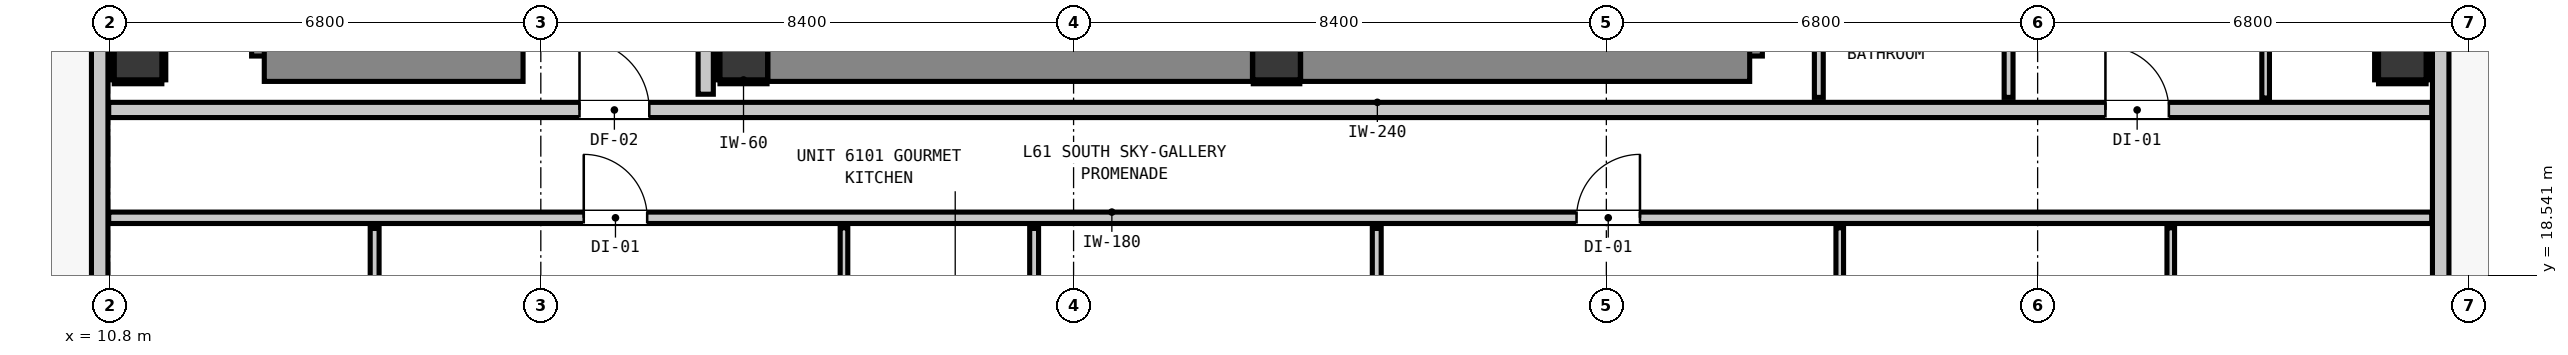
"""IFC4 building model, lengths in metres.
Left out: names, types, materials, properties, quantities, classifications, styles, units other than length and angle.
Written with IfcOpenShell. Run it as: python <this file> out.ifc"""

import sys

from ifc_helpers import new_model, si_unit, direction, frame, frame_2d, origin, origin_2d, place, context, subcontext, project, spatial, rectangle, extrude, element, fill, save


model = new_model("IFC4")
c1 = context("Model", 3, precision=1e-05, world=origin(), true_north=direction((0.0, 1.0)))
c2 = subcontext(c1, "Body", "Model", "MODEL_VIEW")
j1 = project(units=[si_unit("LENGTHUNIT", "METRE"), si_unit("PLANEANGLEUNIT", "RADIAN")], contexts=[c1])
p1 = place(None, origin())
s1 = spatial("IfcSite", under=j1, at=p1, CompositionType="ELEMENT")
p2 = place(p1, origin())
s2 = spatial("IfcBuilding", under=s1, at=p2, CompositionType="ELEMENT")
p3 = place(p2, frame((0.0, 0.0, 210.08)))
s3 = spatial("IfcBuildingStorey", under=s2, at=p3, CompositionType="ELEMENT", Elevation=210.08)
for number, where, z_axis, x_axis in (
    (1, (20.8, 22.0, 0.0), (0.0, 0.0, 1.0), (1.0, 0.0, 0.0)),
    (2, (29.2, 22.0, 0.0), (0.0, 0.0, 1.0), (1.0, 0.0, 0.0)),
):
    element("IfcColumn", number, at=place(p3, frame(where, z_axis=z_axis, x_axis=x_axis)), inside=s3, PredefinedType="COLUMN", context=c2, shape_type="SweptSolid", body=[
        extrude(rectangle(XDim=0.75, YDim=0.75, at=origin_2d()), origin(), (0.0, 0.0, 1.0), 3.32),
    ])
p4 = place(p3, frame((13.44, 22.0, 0.0), z_axis=(0.0, 0.0, 1.0), x_axis=(0.0, 1.0, 0.0)))
e3 = element("IfcWall", 3, at=p4, inside=s3, PredefinedType="SHEAR", context=c2, shape_type="SweptSolid", body=[
    extrude(rectangle(XDim=8.32, YDim=0.8, at=frame_2d((4.16, 0.0))), origin(), (0.0, 0.0, 1.0), 3.32),
])
p5 = place(p3, frame((13.24, 22.0, 0.0), z_axis=(0.0, 0.0, 1.0), x_axis=(1.0, 0.0, 0.0)))
e4 = element("IfcWall", 4, at=p5, inside=s3, PredefinedType="SHEAR", context=c2, shape_type="SweptSolid", body=[
    extrude(rectangle(XDim=4.08, YDim=0.8, at=frame_2d((2.04, 0.0))), origin(), (0.0, 0.0, 1.0), 3.32),
])
p6 = place(p3, frame((36.46, 22.0, 0.0), z_axis=(0.0, 0.0, 1.0), x_axis=(0.0, 1.0, 0.0)))
e5 = element("IfcWall", 5, at=p6, inside=s3, PredefinedType="SHEAR", context=c2, shape_type="SweptSolid", body=[
    extrude(rectangle(XDim=8.32, YDim=0.8, at=frame_2d((4.16, 0.0))), origin(), (0.0, 0.0, 1.0), 3.32),
])
p7 = place(p3, frame((29.58, 22.0, 0.0), z_axis=(0.0, 0.0, 1.0), x_axis=(1.0, 0.0, 0.0)))
e6 = element("IfcWall", 6, at=p7, inside=s3, PredefinedType="SHEAR", context=c2, shape_type="SweptSolid", body=[
    extrude(rectangle(XDim=7.08, YDim=0.8, at=frame_2d((3.54, 0.0))), origin(), (0.0, 0.0, 1.0), 3.32),
])
p8 = place(p3, frame((21.18, 22.0, 0.0), z_axis=(0.0, 0.0, 1.0), x_axis=(1.0, 0.0, 0.0)))
e7 = element("IfcWall", 7, at=p8, inside=s3, PredefinedType="SHEAR", context=c2, shape_type="SweptSolid", body=[
    extrude(rectangle(XDim=7.64, YDim=0.8, at=frame_2d((3.82, 0.0))), origin(), (0.0, 0.0, 1.0), 3.32),
])
for number, where, z_axis, x_axis in (
    (8, (11.25, 22.0, -0.2), (0.0, 0.0, 1.0), (1.0, 0.0, 0.0)),
    (9, (46.95, 22.0, -0.2), (0.0, 0.0, 1.0), (1.0, 0.0, 0.0)),
):
    element("IfcColumn", number, at=place(p3, frame(where, z_axis=z_axis, x_axis=x_axis)), inside=s3, PredefinedType="COLUMN", context=c2, shape_type="SweptSolid", body=[
        extrude(rectangle(XDim=0.75, YDim=0.75, at=origin_2d()), origin(), (0.0, 0.0, 1.0), 3.52),
    ])
p9 = place(p3, frame((10.645, 12.345, 0.0), z_axis=(0.0, 0.0, 1.0), x_axis=(0.0, 1.0, 0.0)))
e10 = element("IfcWall", 10, at=p9, inside=s3, PredefinedType="STANDARD", context=c2, shape_type="SweptSolid", body=[
    extrude(rectangle(XDim=30.31, YDim=0.26, at=frame_2d((15.155, 0.0))), origin(), (0.0, 0.0, 1.0), 3.1),
])
p10 = place(p9, frame((0.507, 0.0, 0.0)))
e11 = element("IfcOpeningElement", 11, at=p10, cuts=e10, PredefinedType="OPENING", context=c2, shape_type="SweptSolid", body=[
    extrude(rectangle(XDim=1.1, YDim=2.15, at=frame_2d((0.55, 1.075))), frame((0.0, 0.14, 0.0), z_axis=(0.0, -1.0, 0.0), x_axis=(1.0, 0.0, 0.0)), (0.0, 0.0, 1.0), 0.28),
])
p11 = place(p9, frame((2.011, 0.0, 0.85)))
e12 = element("IfcOpeningElement", 12, at=p11, cuts=e10, PredefinedType="OPENING", context=c2, shape_type="SweptSolid", body=[
    extrude(rectangle(XDim=0.9, YDim=1.5, at=frame_2d((0.45, 0.75))), frame((0.0, 0.14, 0.0), z_axis=(0.0, -1.0, 0.0), x_axis=(1.0, 0.0, 0.0)), (0.0, 0.0, 1.0), 0.28),
])
p12 = place(p3, frame((47.555, 42.655, 0.0), z_axis=(0.0, 0.0, 1.0), x_axis=(0.0, -1.0, 0.0)))
e13 = element("IfcWall", 13, at=p12, inside=s3, PredefinedType="STANDARD", context=c2, shape_type="SweptSolid", body=[
    extrude(rectangle(XDim=30.31, YDim=0.26, at=frame_2d((15.155, 0.0))), origin(), (0.0, 0.0, 1.0), 3.1),
])
p13 = place(p12, frame((4.082, 0.0, 0.0)))
e14 = element("IfcOpeningElement", 14, at=p13, cuts=e13, PredefinedType="OPENING", context=c2, shape_type="SweptSolid", body=[
    extrude(rectangle(XDim=1.0, YDim=2.15, at=frame_2d((0.5, 1.075))), frame((0.0, 0.14, 0.0), z_axis=(0.0, -1.0, 0.0), x_axis=(1.0, 0.0, 0.0)), (0.0, 0.0, 1.0), 0.28),
])
p14 = place(p12, frame((24.251, 0.0, 0.85)))
e15 = element("IfcOpeningElement", 15, at=p14, cuts=e13, PredefinedType="OPENING", context=c2, shape_type="SweptSolid", body=[
    extrude(rectangle(XDim=1.8, YDim=1.9, at=frame_2d((0.9, 0.95))), frame((0.0, 0.14, 0.0), z_axis=(0.0, -1.0, 0.0), x_axis=(1.0, 0.0, 0.0)), (0.0, 0.0, 1.0), 0.28),
])
p15 = place(p12, frame((27.808, 0.0, 0.85)))
e16 = element("IfcOpeningElement", 16, at=p15, cuts=e13, PredefinedType="OPENING", context=c2, shape_type="SweptSolid", body=[
    extrude(rectangle(XDim=1.8, YDim=1.9, at=frame_2d((0.9, 0.95))), frame((0.0, 0.14, 0.0), z_axis=(0.0, -1.0, 0.0), x_axis=(1.0, 0.0, 0.0)), (0.0, 0.0, 1.0), 0.28),
])
p16 = place(p3, frame((10.787, 21.15, 0.0), z_axis=(0.0, 0.0, 1.0), x_axis=(1.0, 0.0, 0.0)))
e17 = element("IfcWall", 17, at=p16, inside=s3, PredefinedType="PARTITIONING", context=c2, shape_type="SweptSolid", body=[
    extrude(rectangle(XDim=36.626, YDim=0.24, at=frame_2d((18.313, 0.0))), origin(), (0.0, 0.0, 1.0), 3.1),
])
p17 = place(p16, frame((7.423, 0.0, 0.0)))
e18 = element("IfcOpeningElement", 18, at=p17, cuts=e17, PredefinedType="OPENING", context=c2, shape_type="SweptSolid", body=[
    extrude(rectangle(XDim=1.1, YDim=2.15, at=frame_2d((0.55, 1.075))), frame((0.0, 0.13, 0.0), z_axis=(0.0, -1.0, 0.0), x_axis=(1.0, 0.0, 0.0)), (0.0, 0.0, 1.0), 0.26),
])
p18 = place(p16, frame((31.482, 0.0, 0.0)))
e19 = element("IfcOpeningElement", 19, at=p18, cuts=e17, PredefinedType="OPENING", context=c2, shape_type="SweptSolid", body=[
    extrude(rectangle(XDim=1.0, YDim=2.15, at=frame_2d((0.5, 1.075))), frame((0.0, 0.13, 0.0), z_axis=(0.0, -1.0, 0.0), x_axis=(1.0, 0.0, 0.0)), (0.0, 0.0, 1.0), 0.26),
])
p19 = place(p3, frame((10.787, 19.45, 0.0), z_axis=(0.0, 0.0, 1.0), x_axis=(1.0, 0.0, 0.0)))
e20 = element("IfcWall", 20, at=p19, inside=s3, PredefinedType="PARTITIONING", context=c2, shape_type="SweptSolid", body=[
    extrude(rectangle(XDim=36.626, YDim=0.18, at=frame_2d((18.313, 0.0))), origin(), (0.0, 0.0, 1.0), 3.1),
])
p20 = place(p19, frame((7.49, 0.0, 0.0)))
e21 = element("IfcOpeningElement", 21, at=p20, cuts=e20, PredefinedType="OPENING", context=c2, shape_type="SweptSolid", body=[
    extrude(rectangle(XDim=1.0, YDim=2.15, at=frame_2d((0.5, 1.075))), frame((0.0, 0.1, 0.0), z_axis=(0.0, -1.0, 0.0), x_axis=(1.0, 0.0, 0.0)), (0.0, 0.0, 1.0), 0.2),
])
p21 = place(p19, frame((23.143, 0.0, 0.0)))
e22 = element("IfcOpeningElement", 22, at=p21, cuts=e20, PredefinedType="OPENING", context=c2, shape_type="SweptSolid", body=[
    extrude(rectangle(XDim=1.0, YDim=2.15, at=frame_2d((0.5, 1.075))), frame((0.0, 0.1, 0.0), z_axis=(0.0, -1.0, 0.0), x_axis=(1.0, 0.0, 0.0)), (0.0, 0.0, 1.0), 0.2),
])
p22 = place(p3, frame((20.2, 21.398, 0.0), z_axis=(0.0, 0.0, 1.0), x_axis=(0.0, 1.0, 0.0)))
e23 = element("IfcWall", 23, at=p22, inside=s3, PredefinedType="PARTITIONING", context=c2, shape_type="SweptSolid", body=[
    extrude(rectangle(XDim=6.754, YDim=0.24, at=frame_2d((3.377, 0.0))), origin(), (0.0, 0.0, 1.0), 3.1),
])
p23 = place(p3, frame((14.98, 15.707, 0.0), z_axis=(0.0, 0.0, 1.0), x_axis=(0.0, 1.0, 0.0)))
e24 = element("IfcWall", 24, at=p23, inside=s3, PredefinedType="PARTITIONING", context=c2, shape_type="SweptSolid", body=[
    extrude(rectangle(XDim=3.575, YDim=0.14, at=frame_2d((1.788, 0.0))), origin(), (0.0, 0.0, 1.0), 3.1),
])
p24 = place(p23, frame((1.355, 0.0, 0.0)))
e25 = element("IfcOpeningElement", 25, at=p24, cuts=e24, PredefinedType="OPENING", context=c2, shape_type="SweptSolid", body=[
    extrude(rectangle(XDim=0.86, YDim=2.02, at=frame_2d((0.43, 1.01))), frame((0.0, 0.08, 0.0), z_axis=(0.0, -1.0, 0.0), x_axis=(1.0, 0.0, 0.0)), (0.0, 0.0, 1.0), 0.16),
])
p25 = place(p3, frame((25.378, 15.707, 0.0), z_axis=(0.0, 0.0, 1.0), x_axis=(0.0, 1.0, 0.0)))
e26 = element("IfcWall", 26, at=p25, inside=s3, PredefinedType="PARTITIONING", context=c2, shape_type="SweptSolid", body=[
    extrude(rectangle(XDim=3.575, YDim=0.14, at=frame_2d((1.788, 0.0))), origin(), (0.0, 0.0, 1.0), 3.1),
])
p26 = place(p3, frame((30.78, 15.707, 0.0), z_axis=(0.0, 0.0, 1.0), x_axis=(0.0, 1.0, 0.0)))
e27 = element("IfcWall", 27, at=p26, inside=s3, PredefinedType="PARTITIONING", context=c2, shape_type="SweptSolid", body=[
    extrude(rectangle(XDim=3.575, YDim=0.14, at=frame_2d((1.788, 0.0))), origin(), (0.0, 0.0, 1.0), 3.1),
])
p27 = place(p26, frame((1.355, 0.0, 0.0)))
e28 = element("IfcOpeningElement", 28, at=p27, cuts=e27, PredefinedType="OPENING", context=c2, shape_type="SweptSolid", body=[
    extrude(rectangle(XDim=0.86, YDim=2.02, at=frame_2d((0.43, 1.01))), frame((0.0, 0.08, 0.0), z_axis=(0.0, -1.0, 0.0), x_axis=(1.0, 0.0, 0.0)), (0.0, 0.0, 1.0), 0.16),
])
p28 = place(p3, frame((37.75, 21.348, 0.0), z_axis=(0.0, 0.0, 1.0), x_axis=(0.0, 1.0, 0.0)))
e29 = element("IfcWall", 29, at=p28, inside=s3, PredefinedType="PARTITIONING", context=c2, shape_type="SweptSolid", body=[
    extrude(rectangle(XDim=3.416, YDim=0.14, at=frame_2d((1.708, 0.0))), origin(), (0.0, 0.0, 1.0), 3.1),
])
p29 = place(p3, frame((40.742, 21.348, 0.0), z_axis=(0.0, 0.0, 1.0), x_axis=(0.0, 1.0, 0.0)))
e30 = element("IfcWall", 30, at=p29, inside=s3, PredefinedType="PARTITIONING", context=c2, shape_type="SweptSolid", body=[
    extrude(rectangle(XDim=3.416, YDim=0.14, at=frame_2d((1.708, 0.0))), origin(), (0.0, 0.0, 1.0), 3.1),
])
p30 = place(p29, frame((1.266, 0.0, 0.0)))
e31 = element("IfcOpeningElement", 31, at=p30, cuts=e30, PredefinedType="OPENING", context=c2, shape_type="SweptSolid", body=[
    extrude(rectangle(XDim=0.86, YDim=2.02, at=frame_2d((0.43, 1.01))), frame((0.0, 0.08, 0.0), z_axis=(0.0, -1.0, 0.0), x_axis=(1.0, 0.0, 0.0)), (0.0, 0.0, 1.0), 0.16),
])
p31 = place(p3, frame((22.38, 15.697, 0.0), z_axis=(0.0, 0.0, 1.0), x_axis=(0.0, 1.0, 0.0)))
e32 = element("IfcWall", 32, at=p31, inside=s3, PredefinedType="PARTITIONING", context=c2, shape_type="SweptSolid", body=[
    extrude(rectangle(XDim=3.595, YDim=0.12, at=frame_2d((1.797, 0.0))), origin(), (0.0, 0.0, 1.0), 3.1),
])
p32 = place(p31, frame((1.345, 0.0, 0.0)))
e33 = element("IfcOpeningElement", 33, at=p32, cuts=e32, PredefinedType="OPENING", context=c2, shape_type="SweptSolid", body=[
    extrude(rectangle(XDim=0.9, YDim=2.1, at=frame_2d((0.45, 1.05))), frame((0.0, 0.07, 0.0), z_axis=(0.0, -1.0, 0.0), x_axis=(1.0, 0.0, 0.0)), (0.0, 0.0, 1.0), 0.14),
])
p33 = place(p3, frame((38.08, 15.697, 0.0), z_axis=(0.0, 0.0, 1.0), x_axis=(0.0, 1.0, 0.0)))
e34 = element("IfcWall", 34, at=p33, inside=s3, PredefinedType="PARTITIONING", context=c2, shape_type="SweptSolid", body=[
    extrude(rectangle(XDim=3.595, YDim=0.12, at=frame_2d((1.797, 0.0))), origin(), (0.0, 0.0, 1.0), 3.1),
])
p34 = place(p33, frame((1.345, 0.0, 0.0)))
e35 = element("IfcOpeningElement", 35, at=p34, cuts=e34, PredefinedType="OPENING", context=c2, shape_type="SweptSolid", body=[
    extrude(rectangle(XDim=0.9, YDim=2.1, at=frame_2d((0.45, 1.05))), frame((0.0, 0.07, 0.0), z_axis=(0.0, -1.0, 0.0), x_axis=(1.0, 0.0, 0.0)), (0.0, 0.0, 1.0), 0.14),
])
p35 = place(p3, frame((43.299, 15.697, 0.0), z_axis=(0.0, 0.0, 1.0), x_axis=(0.0, 1.0, 0.0)))
e36 = element("IfcWall", 36, at=p35, inside=s3, PredefinedType="PARTITIONING", context=c2, shape_type="SweptSolid", body=[
    extrude(rectangle(XDim=3.595, YDim=0.12, at=frame_2d((1.797, 0.0))), origin(), (0.0, 0.0, 1.0), 3.1),
])
p36 = place(p35, frame((1.358, 0.0, 0.0)))
e37 = element("IfcOpeningElement", 37, at=p36, cuts=e36, PredefinedType="OPENING", context=c2, shape_type="SweptSolid", body=[
    extrude(rectangle(XDim=0.9, YDim=2.1, at=frame_2d((0.45, 1.05))), frame((0.0, 0.07, 0.0), z_axis=(0.0, -1.0, 0.0), x_axis=(1.0, 0.0, 0.0)), (0.0, 0.0, 1.0), 0.14),
])
p37 = place(p3, frame((44.795, 21.338, 0.0), z_axis=(0.0, 0.0, 1.0), x_axis=(0.0, 1.0, 0.0)))
e38 = element("IfcWall", 38, at=p37, inside=s3, PredefinedType="PARTITIONING", context=c2, shape_type="SweptSolid", body=[
    extrude(rectangle(XDim=8.424, YDim=0.12, at=frame_2d((4.212, 0.0))), origin(), (0.0, 0.0, 1.0), 3.1),
])
p38 = place(p37, frame((3.737, 0.0, 0.0)))
e39 = element("IfcOpeningElement", 39, at=p38, cuts=e38, PredefinedType="OPENING", context=c2, shape_type="SweptSolid", body=[
    extrude(rectangle(XDim=0.9, YDim=2.1, at=frame_2d((0.45, 1.05))), frame((0.0, 0.07, 0.0), z_axis=(0.0, -1.0, 0.0), x_axis=(1.0, 0.0, 0.0)), (0.0, 0.0, 1.0), 0.14),
])
p39 = place(p3, frame((20.425, 21.593, 0.0), z_axis=(0.0, 0.0, 1.0), x_axis=(1.0, 0.0, 0.0)))
e40 = element("IfcWall", 40, at=p39, inside=s3, PredefinedType="PARTITIONING", context=c2, shape_type="SweptSolid", body=[
    extrude(rectangle(XDim=0.742, YDim=0.06, at=frame_2d((0.371, 0.0))), origin(), (0.0, 0.0, 1.0), 1.45),
])
p40 = place(p3, frame((20.393, 21.625, 0.0), z_axis=(0.0, 0.0, 1.0), x_axis=(0.0, 1.0, 0.0)))
e41 = element("IfcWall", 41, at=p40, inside=s3, PredefinedType="PARTITIONING", context=c2, shape_type="SweptSolid", body=[
    extrude(rectangle(XDim=0.75, YDim=0.06, at=frame_2d((0.375, 0.0))), origin(), (0.0, 0.0, 1.0), 1.45),
])
p41 = place(p3, frame((28.833, 21.593, 0.0), z_axis=(0.0, 0.0, 1.0), x_axis=(1.0, 0.0, 0.0)))
e42 = element("IfcWall", 42, at=p41, inside=s3, PredefinedType="PARTITIONING", context=c2, shape_type="SweptSolid", body=[
    extrude(rectangle(XDim=0.734, YDim=0.06, at=frame_2d((0.367, 0.0))), origin(), (0.0, 0.0, 1.0), 1.45),
])
for number, where, z_axis, x_axis in (
    (43, (10.875, 21.593, 0.0), (0.0, 0.0, 1.0), (1.0, 0.0, 0.0)),
    (44, (10.843, 21.625, 0.0), (0.0, 0.0, 1.0), (0.0, 1.0, 0.0)),
    (45, (11.657, 21.625, 0.0), (0.0, 0.0, 1.0), (0.0, 1.0, 0.0)),
    (46, (46.575, 21.593, 0.0), (0.0, 0.0, 1.0), (1.0, 0.0, 0.0)),
    (47, (46.543, 21.625, 0.0), (0.0, 0.0, 1.0), (0.0, 1.0, 0.0)),
    (48, (47.357, 21.625, 0.0), (0.0, 0.0, 1.0), (0.0, 1.0, 0.0)),
):
    element("IfcWall", number, at=place(p3, frame(where, z_axis=z_axis, x_axis=x_axis)), inside=s3, PredefinedType="PARTITIONING", context=c2, shape_type="SweptSolid", body=[
        extrude(rectangle(XDim=0.75, YDim=0.06, at=frame_2d((0.375, 0.0))), origin(), (0.0, 0.0, 1.0), 1.45),
    ])
p42 = place(p17, origin())
e49 = element("IfcDoor", 49, at=p42, inside=s3, OperationType="SINGLE_SWING_LEFT", PredefinedType="DOOR", context=c2, shape_type="SweptSolid", body=[
    extrude(rectangle(XDim=1.1, YDim=2.15, at=frame_2d((0.55, 1.075))), frame((0.0, 0.025, 0.0), z_axis=(0.0, -1.0, 0.0), x_axis=(1.0, 0.0, 0.0)), (0.0, 0.0, 1.0), 0.05),
])
fill(e18, e49)
p43 = place(p20, origin())
e50 = element("IfcDoor", 50, at=p43, inside=s3, OperationType="SINGLE_SWING_LEFT", PredefinedType="DOOR", context=c2, shape_type="SweptSolid", body=[
    extrude(rectangle(XDim=1.0, YDim=2.15, at=frame_2d((0.5, 1.075))), frame((0.0, 0.025, 0.0), z_axis=(0.0, -1.0, 0.0), x_axis=(1.0, 0.0, 0.0)), (0.0, 0.0, 1.0), 0.05),
])
fill(e21, e50)
p44 = place(p21, origin())
e51 = element("IfcDoor", 51, at=p44, inside=s3, OperationType="SINGLE_SWING_RIGHT", PredefinedType="DOOR", context=c2, shape_type="SweptSolid", body=[
    extrude(rectangle(XDim=1.0, YDim=2.15, at=frame_2d((0.5, 1.075))), frame((0.0, 0.025, 0.0), z_axis=(0.0, -1.0, 0.0), x_axis=(1.0, 0.0, 0.0)), (0.0, 0.0, 1.0), 0.05),
])
fill(e22, e51)
p45 = place(p18, origin())
e52 = element("IfcDoor", 52, at=p45, inside=s3, OperationType="SINGLE_SWING_LEFT", PredefinedType="DOOR", context=c2, shape_type="SweptSolid", body=[
    extrude(rectangle(XDim=1.0, YDim=2.15, at=frame_2d((0.5, 1.075))), frame((0.0, 0.025, 0.0), z_axis=(0.0, -1.0, 0.0), x_axis=(1.0, 0.0, 0.0)), (0.0, 0.0, 1.0), 0.05),
])
fill(e19, e52)
save(model, sys.argv[1])
